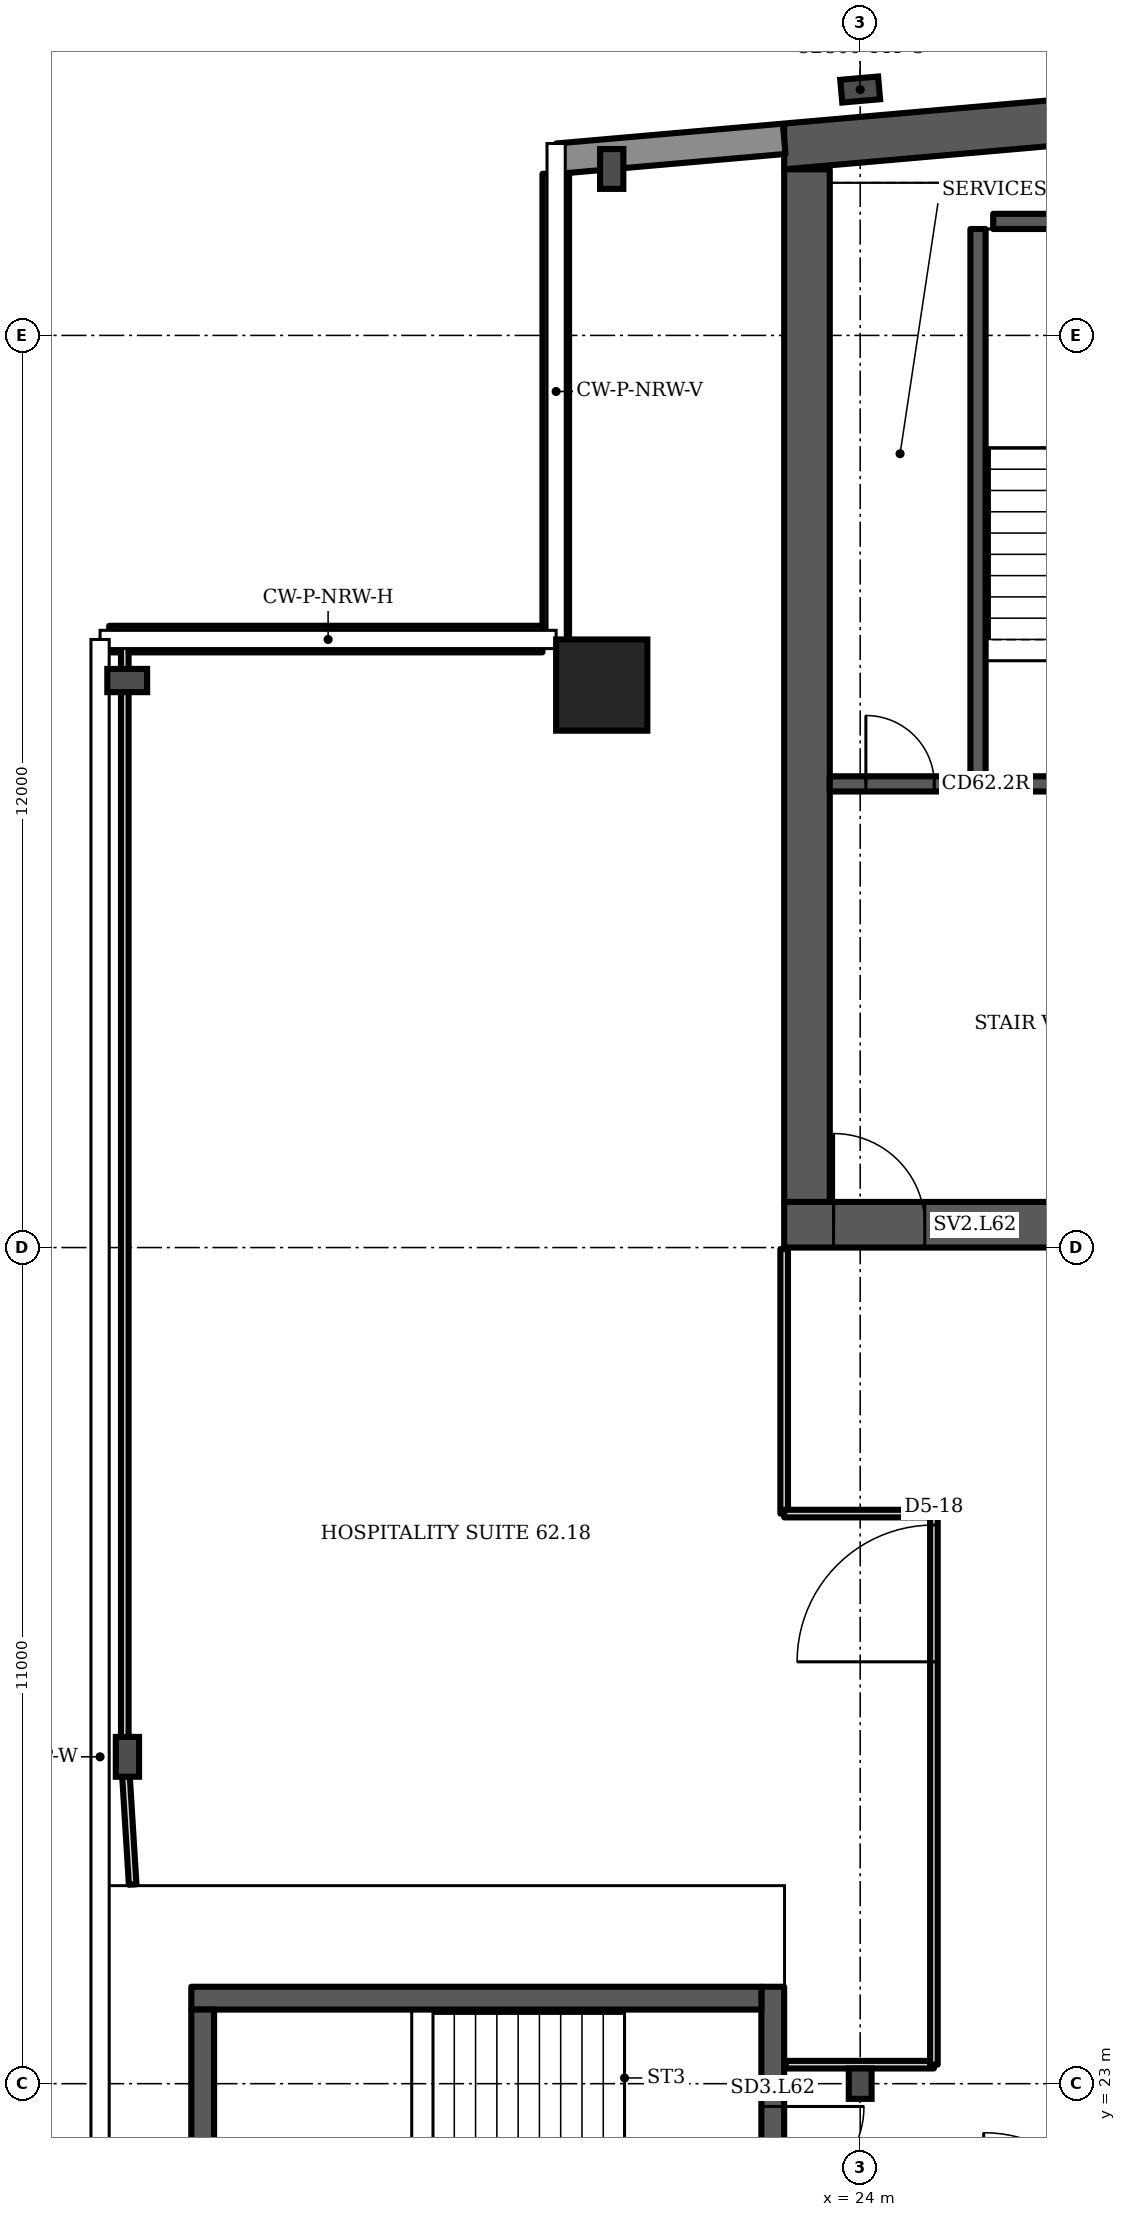
"""IFC4 building model, lengths in metres.
Left out: names, types, materials, properties, quantities, classifications, styles, units other than length and angle.
Written with IfcOpenShell. Run it as: python <this file> out.ifc"""

import sys

from ifc_helpers import new_model, si_unit, direction, frame, frame_2d, origin, origin_2d, place, context, subcontext, project, spatial, polyline, rectangle, i_section, outline, extrude, element, fill, save


model = new_model("IFC4")
c1 = context("Model", 3, precision=1e-05, world=origin(), true_north=direction((0.0, 1.0)))
c2 = subcontext(c1, "Body", "Model", "MODEL_VIEW")
j1 = project(units=[si_unit("LENGTHUNIT", "METRE"), si_unit("PLANEANGLEUNIT", "RADIAN")], contexts=[c1])
p1 = place(None, origin())
s1 = spatial("IfcSite", under=j1, at=p1, CompositionType="ELEMENT")
p2 = place(p1, origin())
s2 = spatial("IfcBuilding", under=s1, at=p2, CompositionType="ELEMENT")
p3 = place(p2, frame((0.0, 0.0, 246.7)))
s3 = spatial("IfcBuildingStorey", under=s2, at=p3, CompositionType="ELEMENT", Elevation=246.7)
p4 = place(p3, origin())
e1 = element("IfcWall", 1, at=p4, inside=s3, PredefinedType="SHEAR", context=c2, shape_type="SweptSolid", body=[
    extrude(outline(polyline([(23.0, 48.185), (40.5, 49.716), (58.0, 48.185), (58.0, 48.787), (40.5, 50.318), (23.0, 48.787), (23.0, 48.185)])), origin(), (0.0, 0.0, 1.0), 3.6),
])
p5 = place(p3, frame((23.0, 34.3, 0.0), z_axis=(0.0, 0.0, 1.0), x_axis=(1.0, 0.0, 0.0)))
e2 = element("IfcWall", 2, at=p5, inside=s3, PredefinedType="SHEAR", context=c2, shape_type="SweptSolid", body=[
    extrude(rectangle(XDim=35.0, YDim=0.6, at=frame_2d((17.5, 0.0))), origin(), (0.0, 0.0, 1.0), 3.6),
])
p6 = place(p5, frame((0.65, 0.0, 0.0)))
e3 = element("IfcOpeningElement", 3, at=p6, cuts=e2, PredefinedType="OPENING", context=c2, shape_type="SweptSolid", body=[
    extrude(rectangle(XDim=1.2, YDim=2.1, at=frame_2d((0.6, 1.05))), frame((0.0, 0.31, 0.0), z_axis=(0.0, -1.0, 0.0), x_axis=(1.0, 0.0, 0.0)), (0.0, 0.0, 1.0), 0.62),
])
p7 = place(p5, frame((7.717, 0.0, 0.0)))
e4 = element("IfcOpeningElement", 4, at=p7, cuts=e2, PredefinedType="OPENING", context=c2, shape_type="SweptSolid", body=[
    extrude(rectangle(XDim=1.1, YDim=2.1, at=frame_2d((0.55, 1.05))), frame((0.0, 0.31, 0.0), z_axis=(0.0, -1.0, 0.0), x_axis=(1.0, 0.0, 0.0)), (0.0, 0.0, 1.0), 0.62),
])
p8 = place(p5, frame((12.183, 0.0, 0.0)))
e5 = element("IfcOpeningElement", 5, at=p8, cuts=e2, PredefinedType="OPENING", context=c2, shape_type="SweptSolid", body=[
    extrude(rectangle(XDim=1.1, YDim=2.1, at=frame_2d((0.55, 1.05))), frame((0.0, 0.31, 0.0), z_axis=(0.0, -1.0, 0.0), x_axis=(1.0, 0.0, 0.0)), (0.0, 0.0, 1.0), 0.62),
])
p9 = place(p5, frame((9.8, 0.0, 0.0)))
e6 = element("IfcOpeningElement", 6, at=p9, cuts=e2, PredefinedType="OPENING", context=c2, shape_type="SweptSolid", body=[
    extrude(rectangle(XDim=1.4, YDim=2.1, at=frame_2d((0.7, 1.05))), frame((0.0, 0.31, 0.0), z_axis=(0.0, -1.0, 0.0), x_axis=(1.0, 0.0, 0.0)), (0.0, 0.0, 1.0), 0.62),
])
p10 = place(p5, frame((14.717, 0.0, 0.0)))
e7 = element("IfcOpeningElement", 7, at=p10, cuts=e2, PredefinedType="OPENING", context=c2, shape_type="SweptSolid", body=[
    extrude(rectangle(XDim=1.1, YDim=2.1, at=frame_2d((0.55, 1.05))), frame((0.0, 0.31, 0.0), z_axis=(0.0, -1.0, 0.0), x_axis=(1.0, 0.0, 0.0)), (0.0, 0.0, 1.0), 0.62),
])
p11 = place(p5, frame((16.95, 0.0, 0.0)))
e8 = element("IfcOpeningElement", 8, at=p11, cuts=e2, PredefinedType="OPENING", context=c2, shape_type="SweptSolid", body=[
    extrude(rectangle(XDim=1.1, YDim=2.1, at=frame_2d((0.55, 1.05))), frame((0.0, 0.31, 0.0), z_axis=(0.0, -1.0, 0.0), x_axis=(1.0, 0.0, 0.0)), (0.0, 0.0, 1.0), 0.62),
])
p12 = place(p5, frame((19.183, 0.0, 0.0)))
e9 = element("IfcOpeningElement", 9, at=p12, cuts=e2, PredefinedType="OPENING", context=c2, shape_type="SweptSolid", body=[
    extrude(rectangle(XDim=1.1, YDim=2.1, at=frame_2d((0.55, 1.05))), frame((0.0, 0.31, 0.0), z_axis=(0.0, -1.0, 0.0), x_axis=(1.0, 0.0, 0.0)), (0.0, 0.0, 1.0), 0.62),
])
p13 = place(p5, frame((26.15, 0.0, 0.0)))
e10 = element("IfcOpeningElement", 10, at=p13, cuts=e2, PredefinedType="OPENING", context=c2, shape_type="SweptSolid", body=[
    extrude(rectangle(XDim=1.2, YDim=2.1, at=frame_2d((0.6, 1.05))), frame((0.0, 0.31, 0.0), z_axis=(0.0, -1.0, 0.0), x_axis=(1.0, 0.0, 0.0)), (0.0, 0.0, 1.0), 0.62),
])
p14 = place(p5, frame((30.8, 0.0, 0.0)))
e11 = element("IfcOpeningElement", 11, at=p14, cuts=e2, PredefinedType="OPENING", context=c2, shape_type="SweptSolid", body=[
    extrude(rectangle(XDim=1.4, YDim=2.1, at=frame_2d((0.7, 1.05))), frame((0.0, 0.31, 0.0), z_axis=(0.0, -1.0, 0.0), x_axis=(1.0, 0.0, 0.0)), (0.0, 0.0, 1.0), 0.62),
])
p15 = place(p3, frame((23.3, 34.6, 0.0), z_axis=(0.0, 0.0, 1.0), x_axis=(0.0, 1.0, 0.0)))
e12 = element("IfcWall", 12, at=p15, inside=s3, PredefinedType="SHEAR", context=c2, shape_type="SweptSolid", body=[
    extrude(rectangle(XDim=13.585, YDim=0.6, at=frame_2d((6.792, 0.0))), origin(), (0.0, 0.0, 1.0), 3.6),
])
p16 = place(p3, frame((20.6, 41.4, 0.0), z_axis=(0.0, 0.0, 1.0), x_axis=(1.0, 0.0, 0.0)))
e13 = element("IfcColumn", 13, at=p16, inside=s3, PredefinedType="COLUMN", context=c2, shape_type="SweptSolid", body=[
    extrude(rectangle(XDim=1.2, YDim=1.2, at=origin_2d()), origin(), (0.0, 0.0, 1.0), 3.6),
])
for number, where, z_axis, x_axis in (
    (14, (20.731, 48.19, 0.0), (0.0, 0.0, 1.0), (-1.0, 0.0, 0.0)),
    (15, (14.357, 41.46, 0.0), (0.0, 0.0, 1.0), (0.0, 1.0, 0.0)),
    (16, (14.36, 27.3, 0.0), (0.0, 0.0, 1.0), (-1.0, 0.0, 0.0)),
):
    element("IfcColumn", number, at=place(p3, frame(where, z_axis=z_axis, x_axis=x_axis)), inside=s3, PredefinedType="COLUMN", context=c2, shape_type="SweptSolid", body=[
        extrude(i_section(OverallWidth=0.306, OverallDepth=0.524, WebThickness=0.021, FlangeThickness=0.04, FilletRadius=0.027, at=origin_2d()), origin(), (0.0, 0.0, 1.0), 3.6),
    ])
p17 = place(p3, frame((24.0, 23.0, 0.0), z_axis=(0.0, 0.0, 1.0), x_axis=(1.0, 0.0, 0.0)))
e17 = element("IfcColumn", 17, at=p17, inside=s3, PredefinedType="COLUMN", context=c2, shape_type="SweptSolid", body=[
    extrude(i_section(OverallWidth=0.3, OverallDepth=0.4, WebThickness=0.013, FlangeThickness=0.024, FilletRadius=0.027, at=origin_2d()), origin(), (0.0, 0.0, 1.0), 3.6),
])
p18 = place(p3, frame((24.0, 49.235, 0.0), z_axis=(0.0, 0.0, 1.0), x_axis=(-0.087156, 0.996197, 0.0)))
e18 = element("IfcColumn", 18, at=p18, inside=s3, PredefinedType="COLUMN", context=c2, shape_type="SweptSolid", body=[
    extrude(i_section(OverallWidth=0.3, OverallDepth=0.5, WebThickness=0.014, FlangeThickness=0.028, FilletRadius=0.027, at=origin_2d()), origin(), (0.0, 0.0, 1.0), 3.6),
])
p19 = place(p3, frame((23.0, 48.587, 0.0), z_axis=(0.0, 0.0, 1.0), x_axis=(-0.996194, -0.087168, 0.0)))
e19 = element("IfcWall", 19, at=p19, inside=s3, PredefinedType="SOLIDWALL", context=c2, shape_type="SweptSolid", body=[
    extrude(rectangle(XDim=2.994, YDim=0.4, at=frame_2d((1.497, 0.0))), origin(), (0.0, 0.0, 1.0), 3.2),
])
p20 = place(p3, frame((19.995, 48.126, 0.0), z_axis=(0.0, 0.0, 1.0), x_axis=(0.0, -1.0, 0.0)))
e20 = element("IfcWall", 20, at=p20, inside=s3, PredefinedType="SOLIDWALL", context=c2, shape_type="SweptSolid", body=[
    extrude(rectangle(XDim=6.126, YDim=0.35, at=frame_2d((3.063, 0.0))), origin(), (0.0, 0.0, 1.0), 1.0),
])
p21 = place(p3, frame((19.82, 42.005, 0.0), z_axis=(0.0, 0.0, 1.0), x_axis=(-1.0, 0.0, 0.0)))
e21 = element("IfcWall", 21, at=p21, inside=s3, PredefinedType="SOLIDWALL", context=c2, shape_type="SweptSolid", body=[
    extrude(rectangle(XDim=5.7, YDim=0.35, at=frame_2d((2.85, 0.0))), origin(), (0.0, 0.0, 1.0), 1.0),
])
p22 = place(p3, frame((23.6, 40.1, 0.0), z_axis=(0.0, 0.0, 1.0), x_axis=(1.0, 0.0, 0.0)))
e22 = element("IfcWall", 22, at=p22, inside=s3, PredefinedType="SHEAR", context=c2, shape_type="SweptSolid", body=[
    extrude(rectangle(XDim=6.1, YDim=0.2, at=frame_2d((3.05, 0.0))), origin(), (0.0, 0.0, 1.0), 3.2),
])
p23 = place(p22, frame((3.325, 0.0, 0.0)))
e23 = element("IfcOpeningElement", 23, at=p23, cuts=e22, PredefinedType="OPENING", context=c2, shape_type="SweptSolid", body=[
    extrude(rectangle(XDim=1.2, YDim=2.1, at=frame_2d((0.6, 1.05))), frame((0.0, 0.11, 0.0), z_axis=(0.0, -1.0, 0.0), x_axis=(1.0, 0.0, 0.0)), (0.0, 0.0, 1.0), 0.22),
])
p24 = place(p22, frame((0.475, 0.0, 0.0)))
e24 = element("IfcOpeningElement", 24, at=p24, cuts=e22, PredefinedType="OPENING", context=c2, shape_type="SweptSolid", body=[
    extrude(rectangle(XDim=0.9, YDim=2.1, at=frame_2d((0.45, 1.05))), frame((0.0, 0.11, 0.0), z_axis=(0.0, -1.0, 0.0), x_axis=(1.0, 0.0, 0.0)), (0.0, 0.0, 1.0), 0.22),
])
p25 = place(p3, frame((25.55, 40.2, 0.0), z_axis=(0.0, 0.0, 1.0), x_axis=(0.0, 1.0, 0.0)))
e25 = element("IfcWall", 25, at=p25, inside=s3, PredefinedType="SHEAR", context=c2, shape_type="SweptSolid", body=[
    extrude(rectangle(XDim=7.2, YDim=0.2, at=frame_2d((3.6, 0.0))), origin(), (0.0, 0.0, 1.0), 3.2),
])
p26 = place(p3, frame((25.75, 47.5, 0.0), z_axis=(0.0, 0.0, 1.0), x_axis=(1.0, 0.0, 0.0)))
e26 = element("IfcWall", 26, at=p26, inside=s3, PredefinedType="SHEAR", context=c2, shape_type="SweptSolid", body=[
    extrude(rectangle(XDim=3.95, YDim=0.2, at=frame_2d((1.975, 0.0))), origin(), (0.0, 0.0, 1.0), 3.2),
])
p27 = place(p3, frame((22.85, 19.925, 0.0), z_axis=(0.0, 0.0, 1.0), x_axis=(0.0, 1.0, 0.0)))
e27 = element("IfcWall", 27, at=p27, inside=s3, PredefinedType="SHEAR", context=c2, shape_type="SweptSolid", body=[
    extrude(rectangle(XDim=4.35, YDim=0.3, at=frame_2d((2.175, 0.0))), origin(), (0.0, 0.0, 1.0), 3.2),
])
p28 = place(p27, frame((1.575, 0.0, 0.0)))
e28 = element("IfcOpeningElement", 28, at=p28, cuts=e27, PredefinedType="OPENING", context=c2, shape_type="SweptSolid", body=[
    extrude(rectangle(XDim=1.2, YDim=2.1, at=frame_2d((0.6, 1.05))), frame((0.0, 0.16, 0.0), z_axis=(0.0, -1.0, 0.0), x_axis=(1.0, 0.0, 0.0)), (0.0, 0.0, 1.0), 0.32),
])
p29 = place(p3, frame((14.325, 27.3, 0.0), z_axis=(0.0, 0.0, 1.0), x_axis=(0.0, 1.0, 0.0)))
e29 = element("IfcWall", 29, at=p29, inside=s3, PredefinedType="PARTITIONING", context=c2, shape_type="SweptSolid", body=[
    extrude(rectangle(XDim=14.68, YDim=0.1, at=frame_2d((7.34, 0.0))), origin(), (0.0, 0.0, 1.0), 2.58),
])
p30 = place(p3, frame((14.429, 25.62, 0.0), z_axis=(0.0, 0.0, 1.0), x_axis=(-0.061647, 0.998101, 0.0)))
e30 = element("IfcWall", 30, at=p30, inside=s3, PredefinedType="PARTITIONING", context=c2, shape_type="SweptSolid", body=[
    extrude(rectangle(XDim=1.683, YDim=0.1, at=frame_2d((0.842, 0.0))), origin(), (0.0, 0.0, 1.0), 3.2),
])
p31 = place(p3, frame((23.0, 30.5, 0.0), z_axis=(0.0, 0.0, 1.0), x_axis=(0.0, 1.0, 0.0)))
e31 = element("IfcWall", 31, at=p31, inside=s3, PredefinedType="PARTITIONING", context=c2, shape_type="SweptSolid", body=[
    extrude(rectangle(XDim=3.48, YDim=0.1, at=frame_2d((1.74, 0.0))), origin(), (0.0, 0.0, 1.0), 3.2),
])
p32 = place(p3, frame((23.0, 30.5, 0.0), z_axis=(0.0, 0.0, 1.0), x_axis=(1.0, 0.0, 0.0)))
e32 = element("IfcWall", 32, at=p32, inside=s3, PredefinedType="PARTITIONING", context=c2, shape_type="SweptSolid", body=[
    extrude(rectangle(XDim=1.97, YDim=0.1, at=frame_2d((0.985, 0.0))), origin(), (0.0, 0.0, 1.0), 3.2),
])
p33 = place(p3, frame((23.02, 23.25, 0.0), z_axis=(0.0, 0.0, 1.0), x_axis=(1.0, 0.0, 0.0)))
e33 = element("IfcWall", 33, at=p33, inside=s3, PredefinedType="PARTITIONING", context=c2, shape_type="SweptSolid", body=[
    extrude(rectangle(XDim=1.95, YDim=0.1, at=frame_2d((0.975, 0.0))), origin(), (0.0, 0.0, 1.0), 3.2),
])
p34 = place(p3, frame((24.97, 23.25, 0.0), z_axis=(0.0, 0.0, 1.0), x_axis=(0.0, 1.0, 0.0)))
e34 = element("IfcWall", 34, at=p34, inside=s3, PredefinedType="PARTITIONING", context=c2, shape_type="SweptSolid", body=[
    extrude(rectangle(XDim=7.25, YDim=0.1, at=frame_2d((3.625, 0.0))), origin(), (0.0, 0.0, 1.0), 3.2),
])
p35 = place(p34, frame((5.3, 0.0, 0.0)))
e35 = element("IfcOpeningElement", 35, at=p35, cuts=e34, PredefinedType="OPENING", context=c2, shape_type="SweptSolid", body=[
    extrude(rectangle(XDim=1.8, YDim=2.1, at=frame_2d((0.9, 1.05))), frame((0.0, 0.06, 0.0), z_axis=(0.0, -1.0, 0.0), x_axis=(1.0, 0.0, 0.0)), (0.0, 0.0, 1.0), 0.12),
])
p36 = place(p3, frame((15.2, 24.125, 0.0), z_axis=(0.0, 0.0, 1.0), x_axis=(1.0, 0.0, 0.0)))
e36 = element("IfcWall", 36, at=p36, inside=s3, PredefinedType="SHEAR", context=c2, shape_type="SweptSolid", body=[
    extrude(rectangle(XDim=7.5, YDim=0.3, at=frame_2d((3.75, 0.0))), origin(), (0.0, 0.0, 1.0), 3.2),
])
p37 = place(p3, frame((15.35, 20.225, 0.0), z_axis=(0.0, 0.0, 1.0), x_axis=(0.0, 1.0, 0.0)))
e37 = element("IfcWall", 37, at=p37, inside=s3, PredefinedType="SHEAR", context=c2, shape_type="SweptSolid", body=[
    extrude(rectangle(XDim=3.75, YDim=0.3, at=frame_2d((1.875, 0.0))), origin(), (0.0, 0.0, 1.0), 3.2),
])
p38 = place(p24, origin())
e38 = element("IfcDoor", 38, at=p38, inside=s3, OperationType="SINGLE_SWING_LEFT", PredefinedType="DOOR", context=c2, shape_type="SweptSolid", body=[
    extrude(rectangle(XDim=0.9, YDim=2.1, at=frame_2d((0.45, 1.05))), frame((0.0, 0.025, 0.0), z_axis=(0.0, -1.0, 0.0), x_axis=(1.0, 0.0, 0.0)), (0.0, 0.0, 1.0), 0.05),
])
fill(e24, e38)
p39 = place(p6, origin())
e39 = element("IfcDoor", 39, at=p39, inside=s3, OperationType="SINGLE_SWING_LEFT", PredefinedType="DOOR", context=c2, shape_type="SweptSolid", body=[
    extrude(rectangle(XDim=1.2, YDim=2.1, at=frame_2d((0.6, 1.05))), frame((0.0, 0.025, 0.0), z_axis=(0.0, -1.0, 0.0), x_axis=(1.0, 0.0, 0.0)), (0.0, 0.0, 1.0), 0.05),
])
fill(e3, e39)
p40 = place(p28, origin())
e40 = element("IfcDoor", 40, at=p40, inside=s3, OperationType="SINGLE_SWING_RIGHT", PredefinedType="DOOR", context=c2, shape_type="SweptSolid", body=[
    extrude(rectangle(XDim=1.2, YDim=2.1, at=frame_2d((0.6, 1.05))), frame((0.0, 0.025, 0.0), z_axis=(0.0, -1.0, 0.0), x_axis=(1.0, 0.0, 0.0)), (0.0, 0.0, 1.0), 0.05),
])
fill(e28, e40)
p41 = place(p35, origin())
e41 = element("IfcDoor", 41, at=p41, inside=s3, OperationType="DOUBLE_DOOR_SINGLE_SWING", PredefinedType="DOOR", context=c2, shape_type="SweptSolid", body=[
    extrude(rectangle(XDim=1.8, YDim=2.1, at=frame_2d((0.9, 1.05))), frame((0.0, 0.025, 0.0), z_axis=(0.0, -1.0, 0.0), x_axis=(1.0, 0.0, 0.0)), (0.0, 0.0, 1.0), 0.05),
])
fill(e35, e41)
save(model, sys.argv[1])
